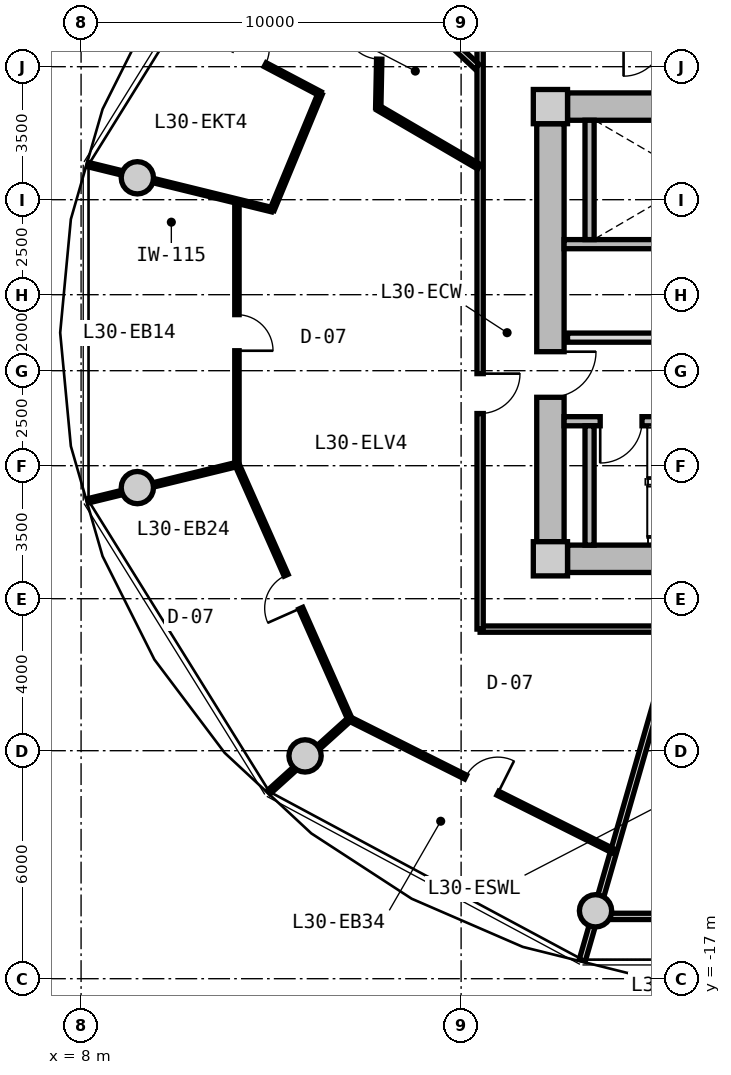
"""IFC4 building model, lengths in metres.
Left out: names, types, materials, properties, quantities, classifications, styles, units other than length and angle.
Written with IfcOpenShell. Run it as: python <this file> out.ifc"""

import sys

from ifc_helpers import new_model, si_unit, direction, frame, frame_2d, origin, origin_2d, place, context, subcontext, project, spatial, rectangle, circle, extrude, source, transform, mapped, element, fill, save


model = new_model("IFC4")
c1 = context("Model", 3, precision=1e-05, world=origin(), true_north=direction((0.0, 1.0)))
c2 = subcontext(c1, "Body", "Model", "MODEL_VIEW")
j1 = project(units=[si_unit("LENGTHUNIT", "METRE"), si_unit("PLANEANGLEUNIT", "RADIAN")], contexts=[c1])
p1 = place(None, origin())
s1 = spatial("IfcSite", under=j1, at=p1, CompositionType="ELEMENT")
p2 = place(p1, origin())
s2 = spatial("IfcBuilding", under=s1, at=p2, CompositionType="ELEMENT")
p3 = place(p2, frame((0.0, 0.0, 99.3)))
s3 = spatial("IfcBuildingStorey", under=s2, at=p3, CompositionType="ELEMENT", Elevation=99.3)
m1 = source(origin(), c2, "Body", "SweptSolid", [
    extrude(rectangle(XDim=0.9, YDim=0.9, at=origin_2d()), origin(), (0.0, 0.0, 1.0), 3.05),
])
for number, where, z_axis, x_axis in (
    (1, (20.35, -5.95, 0.0), (0.0, 0.0, 1.0), (1.0, 0.0, 0.0)),
    (2, (20.35, 5.95, 0.0), (0.0, 0.0, 1.0), (1.0, 0.0, 0.0)),
):
    element("IfcColumn", number, at=place(p3, frame(where, z_axis=z_axis, x_axis=x_axis)), inside=s3, PredefinedType="COLUMN", context=c2, shape_type="MappedRepresentation", body=[
        mapped(m1, transform((0.0, 0.0, 0.0), x_axis=(1.0, 0.0, 0.0), y_axis=(0.0, 1.0, 0.0), z_axis=(0.0, 0.0, 1.0), scale=1.0)),
    ])
m2 = source(origin(), c2, "Body", "SweptSolid", [
    extrude(rectangle(XDim=14.4, YDim=0.72, at=frame_2d((7.2, 0.0))), origin(), (0.0, 0.0, 1.0), 2.79),
])
for number, where, z_axis, x_axis in (
    (3, (20.8, 5.95, 0.0), (0.0, 0.0, 1.0), (1.0, 0.0, 0.0)),
    (4, (35.2, -5.95, 0.0), (0.0, 0.0, 1.0), (-1.0, 0.0, 0.0)),
):
    element("IfcWall", number, at=place(p3, frame(where, z_axis=z_axis, x_axis=x_axis)), inside=s3, PredefinedType="SHEAR", context=c2, shape_type="MappedRepresentation", body=[
        mapped(m2, transform((0.0, 0.0, 0.0), x_axis=(1.0, 0.0, 0.0), y_axis=(0.0, 1.0, 0.0), z_axis=(0.0, 0.0, 1.0), scale=1.0)),
    ])
m3 = source(origin(), c2, "Body", "SweptSolid", [
    extrude(rectangle(XDim=11.0, YDim=0.72, at=frame_2d((5.5, 0.0))), origin(), (0.0, 0.0, 1.0), 2.79),
])
p4 = place(p3, frame((20.35, -5.5, 0.0), z_axis=(0.0, 0.0, 1.0), x_axis=(0.0, 1.0, 0.0)))
e5 = element("IfcWall", 5, at=p4, inside=s3, PredefinedType="SHEAR", context=c2, shape_type="MappedRepresentation", body=[
    mapped(m3, transform((0.0, 0.0, 0.0), x_axis=(1.0, 0.0, 0.0), y_axis=(0.0, 1.0, 0.0), z_axis=(0.0, 0.0, 1.0), scale=1.0)),
])
p5 = place(p4, frame((3.8, 0.0, 0.0)))
e6 = element("IfcOpeningElement", 6, at=p5, cuts=e5, PredefinedType="OPENING", context=c2, shape_type="SweptSolid", body=[
    extrude(rectangle(XDim=1.2, YDim=2.15, at=frame_2d((0.6, 1.075))), frame((0.0, 0.37, 0.0), z_axis=(0.0, -1.0, 0.0), x_axis=(1.0, 0.0, 0.0)), (0.0, 0.0, 1.0), 0.74),
])
m4 = source(origin(), c2, "Body", "SweptSolid", [
    extrude(circle(Radius=0.425, at=origin_2d()), origin(), (0.0, 0.0, 1.0), 3.05),
])
for number, where, z_axis, x_axis in (
    (7, (9.481, 4.076, 0.0), (0.0, 0.0, 1.0), (1.0, 0.0, 0.0)),
    (8, (9.481, -4.076, 0.0), (0.0, 0.0, 1.0), (1.0, 0.0, 0.0)),
    (9, (13.894, -11.137, 0.0), (0.0, 0.0, 1.0), (1.0, 0.0, 0.0)),
    (10, (21.537, -15.213, 0.0), (0.0, 0.0, 1.0), (1.0, 0.0, 0.0)),
):
    element("IfcColumn", number, at=place(p3, frame(where, z_axis=z_axis, x_axis=x_axis)), inside=s3, PredefinedType="COLUMN", context=c2, shape_type="MappedRepresentation", body=[
        mapped(m4, transform((0.0, 0.0, 0.0), x_axis=(1.0, 0.0, 0.0), y_axis=(0.0, 1.0, 0.0), z_axis=(0.0, 0.0, 1.0), scale=1.0)),
    ])
m5 = source(origin(), c2, "Body", "SweptSolid", [
    extrude(rectangle(XDim=7.83, YDim=0.24, at=frame_2d((3.915, 0.0))), origin(), (0.0, 0.0, 1.0), 2.79),
])
p6 = place(p3, frame((20.71, 2.33, 0.0), z_axis=(0.0, 0.0, 1.0), x_axis=(1.0, 0.0, 0.0)))
e11 = element("IfcWall", 11, at=p6, inside=s3, PredefinedType="PARTITIONING", context=c2, shape_type="MappedRepresentation", body=[
    mapped(m5, transform((0.0, 0.0, 0.0), x_axis=(1.0, 0.0, 0.0), y_axis=(0.0, 1.0, 0.0), z_axis=(0.0, 0.0, 1.0), scale=1.0)),
])
m6 = source(origin(), c2, "Body", "SweptSolid", [
    extrude(rectangle(XDim=3.14, YDim=0.24, at=frame_2d((1.57, 0.0))), origin(), (0.0, 0.0, 1.0), 2.79),
])
p7 = place(p3, frame((21.38, 2.45, 0.0), z_axis=(0.0, 0.0, 1.0), x_axis=(0.0, 1.0, 0.0)))
e12 = element("IfcWall", 12, at=p7, inside=s3, PredefinedType="PARTITIONING", context=c2, shape_type="MappedRepresentation", body=[
    mapped(m6, transform((0.0, 0.0, 0.0), x_axis=(1.0, 0.0, 0.0), y_axis=(0.0, 1.0, 0.0), z_axis=(0.0, 0.0, 1.0), scale=1.0)),
])
p8 = place(p3, frame((20.71, -2.33, 0.0), z_axis=(0.0, 0.0, 1.0), x_axis=(1.0, 0.0, 0.0)))
e13 = element("IfcWall", 13, at=p8, inside=s3, PredefinedType="PARTITIONING", context=c2, shape_type="MappedRepresentation", body=[
    mapped(m5, transform((0.0, 0.0, 0.0), x_axis=(1.0, 0.0, 0.0), y_axis=(0.0, 1.0, 0.0), z_axis=(0.0, 0.0, 1.0), scale=1.0)),
])
p9 = place(p8, frame((0.95, 0.0, 0.0)))
e14 = element("IfcOpeningElement", 14, at=p9, cuts=e13, PredefinedType="OPENING", context=c2, shape_type="SweptSolid", body=[
    extrude(rectangle(XDim=1.1, YDim=2.15, at=frame_2d((0.55, 1.075))), frame((0.0, 0.13, 0.0), z_axis=(0.0, -1.0, 0.0), x_axis=(1.0, 0.0, 0.0)), (0.0, 0.0, 1.0), 0.26),
])
p10 = place(p3, frame((21.38, -5.59, 0.0), z_axis=(0.0, 0.0, 1.0), x_axis=(0.0, 1.0, 0.0)))
e15 = element("IfcWall", 15, at=p10, inside=s3, PredefinedType="PARTITIONING", context=c2, shape_type="MappedRepresentation", body=[
    mapped(m6, transform((0.0, 0.0, 0.0), x_axis=(1.0, 0.0, 0.0), y_axis=(0.0, 1.0, 0.0), z_axis=(0.0, 0.0, 1.0), scale=1.0)),
])
m7 = source(origin(), c2, "Body", "SweptSolid", [
    extrude(rectangle(XDim=7.62, YDim=0.24, at=frame_2d((3.81, 0.0))), origin(), (0.0, 0.0, 1.0), 2.775),
])
p11 = place(p3, frame((20.8, -0.13, 0.0), z_axis=(0.0, 0.0, 1.0), x_axis=(1.0, 0.0, 0.0)))
e16 = element("IfcWall", 16, at=p11, inside=s3, PredefinedType="PARTITIONING", context=c2, shape_type="MappedRepresentation", body=[
    mapped(m7, transform((0.0, 0.0, 0.0), x_axis=(1.0, 0.0, 0.0), y_axis=(0.0, 1.0, 0.0), z_axis=(0.0, 0.0, 1.0), scale=1.0)),
])
p12 = place(p11, frame((6.22, 0.0, 0.0)))
e17 = element("IfcOpeningElement", 17, at=p12, cuts=e16, PredefinedType="OPENING", context=c2, shape_type="SweptSolid", body=[
    extrude(rectangle(XDim=1.0, YDim=2.1, at=frame_2d((0.5, 1.05))), frame((0.0, 0.13, 0.0), z_axis=(0.0, -1.0, 0.0), x_axis=(1.0, 0.0, 0.0)), (0.0, 0.0, 1.0), 0.26),
])
p13 = place(p11, frame((2.4, 0.0, 0.0)))
e18 = element("IfcOpeningElement", 18, at=p13, cuts=e16, PredefinedType="OPENING", context=c2, shape_type="SweptSolid", body=[
    extrude(rectangle(XDim=1.0, YDim=2.1, at=frame_2d((0.5, 1.05))), frame((0.0, 0.13, 0.0), z_axis=(0.0, -1.0, 0.0), x_axis=(1.0, 0.0, 0.0)), (0.0, 0.0, 1.0), 0.26),
])
m8 = source(origin(), c2, "Body", "SweptSolid", [
    extrude(rectangle(XDim=8.6, YDim=0.165, at=frame_2d((4.3, 0.0))), origin(), (0.0, 0.0, 1.0), 2.775),
])
p14 = place(p3, frame((27.1, -7.8, 0.0), z_axis=(0.0, 0.0, 1.0), x_axis=(-1.0, 0.0, 0.0)))
e19 = element("IfcWall", 19, at=p14, inside=s3, PredefinedType="PARTITIONING", context=c2, shape_type="MappedRepresentation", body=[
    mapped(m8, transform((0.0, 0.0, 0.0), x_axis=(1.0, 0.0, 0.0), y_axis=(0.0, 1.0, 0.0), z_axis=(0.0, 0.0, 1.0), scale=1.0)),
])
m9 = source(origin(), c2, "Body", "SweptSolid", [
    extrude(rectangle(XDim=15.6, YDim=0.165, at=frame_2d((7.8, 0.0))), origin(), (0.0, 0.0, 1.0), 2.775),
])
p15 = place(p3, frame((18.5, -7.8, 0.0), z_axis=(0.0, 0.0, 1.0), x_axis=(0.0, 1.0, 0.0)))
e20 = element("IfcWall", 20, at=p15, inside=s3, PredefinedType="PARTITIONING", context=c2, shape_type="MappedRepresentation", body=[
    mapped(m9, transform((0.0, 0.0, 0.0), x_axis=(1.0, 0.0, 0.0), y_axis=(0.0, 1.0, 0.0), z_axis=(0.0, 0.0, 1.0), scale=1.0)),
])
p16 = place(p15, frame((5.673, 0.0, 0.0)))
e21 = element("IfcOpeningElement", 21, at=p16, cuts=e20, PredefinedType="OPENING", context=c2, shape_type="SweptSolid", body=[
    extrude(rectangle(XDim=1.05, YDim=2.15, at=frame_2d((0.525, 1.075))), frame((0.0, 0.093, 0.0), z_axis=(0.0, -1.0, 0.0), x_axis=(1.0, 0.0, 0.0)), (0.0, 0.0, 1.0), 0.185),
])
m10 = source(origin(), c2, "Body", "SweptSolid", [
    extrude(rectangle(XDim=7.482, YDim=0.165, at=frame_2d((3.741, 0.0))), origin(), (0.0, 0.0, 1.0), 2.275),
])
p17 = place(p3, frame((18.42, 6.998, 0.0), z_axis=(0.0, 0.0, 1.0), x_axis=(-0.732508698043, 0.680757671489, 0.0)))
e22 = element("IfcWall", 22, at=p17, inside=s3, PredefinedType="PARTITIONING", context=c2, shape_type="MappedRepresentation", body=[
    mapped(m10, transform((0.0, 0.0, 0.0), x_axis=(1.0, 0.0, 0.0), y_axis=(0.0, 1.0, 0.0), z_axis=(0.0, 0.0, 1.0), scale=1.0)),
])
m11 = source(origin(), c2, "Body", "SweptSolid", [
    extrude(rectangle(XDim=8.989, YDim=0.165, at=frame_2d((4.495, 0.0))), origin(), (0.0, 0.0, 1.0), 2.275),
])
p18 = place(p3, frame((23.678, -7.88, 0.0), z_axis=(0.0, 0.0, 1.0), x_axis=(-0.27702323008, -0.960863221274, 0.0)))
e23 = element("IfcWall", 23, at=p18, inside=s3, PredefinedType="PARTITIONING", context=c2, shape_type="MappedRepresentation", body=[
    mapped(m11, transform((0.0, 0.0, 0.0), x_axis=(1.0, 0.0, 0.0), y_axis=(0.0, 1.0, 0.0), z_axis=(0.0, 0.0, 1.0), scale=1.0)),
])
m12 = source(origin(), c2, "Body", "SweptSolid", [
    extrude(rectangle(XDim=5.814, YDim=0.165, at=frame_2d((2.907, 0.0))), origin(), (0.0, 0.0, 1.0), 2.275),
])
p19 = place(p3, frame((21.366, -15.36, 0.0), z_axis=(0.0, 0.0, 1.0), x_axis=(1.0, 0.0, 0.0)))
e24 = element("IfcWall", 24, at=p19, inside=s3, PredefinedType="PARTITIONING", context=c2, shape_type="MappedRepresentation", body=[
    mapped(m12, transform((0.0, 0.0, 0.0), x_axis=(1.0, 0.0, 0.0), y_axis=(0.0, 1.0, 0.0), z_axis=(0.0, 0.0, 1.0), scale=1.0)),
])
m13 = source(origin(), c2, "Body", "SweptSolid", [
    extrude(rectangle(XDim=6.935, YDim=0.115, at=frame_2d((3.468, 0.0))), origin(), (0.0, 0.0, 1.0), 2.775),
])
p20 = place(p3, frame((12.101, 3.468, 0.0), z_axis=(0.0, 0.0, 1.0), x_axis=(0.0, -1.0, 0.0)))
e25 = element("IfcWall", 25, at=p20, inside=s3, PredefinedType="PARTITIONING", context=c2, shape_type="MappedRepresentation", body=[
    mapped(m13, transform((0.0, 0.0, 0.0), x_axis=(1.0, 0.0, 0.0), y_axis=(0.0, 1.0, 0.0), z_axis=(0.0, 0.0, 1.0), scale=1.0)),
])
p21 = place(p20, frame((2.993, 0.0, 0.0)))
e26 = element("IfcOpeningElement", 26, at=p21, cuts=e25, PredefinedType="OPENING", context=c2, shape_type="SweptSolid", body=[
    extrude(rectangle(XDim=0.95, YDim=2.1, at=frame_2d((0.475, 1.05))), frame((0.0, 0.067, 0.0), z_axis=(0.0, -1.0, 0.0), x_axis=(1.0, 0.0, 0.0)), (0.0, 0.0, 1.0), 0.135),
])
m14 = source(origin(), c2, "Body", "SweptSolid", [
    extrude(rectangle(XDim=4.992, YDim=0.115, at=frame_2d((2.496, 0.0))), origin(), (0.0, 0.0, 1.0), 2.275),
])
p22 = place(p3, frame((13.026, 3.236, 0.0), z_axis=(0.0, 0.0, 1.0), x_axis=(-0.971191841847, 0.238298985162, 0.0)))
e27 = element("IfcWall", 27, at=p22, inside=s3, PredefinedType="PARTITIONING", context=c2, shape_type="MappedRepresentation", body=[
    mapped(m14, transform((0.0, 0.0, 0.0), x_axis=(1.0, 0.0, 0.0), y_axis=(0.0, 1.0, 0.0), z_axis=(0.0, 0.0, 1.0), scale=1.0)),
])
m15 = source(origin(), c2, "Body", "SweptSolid", [
    extrude(rectangle(XDim=7.326, YDim=0.115, at=frame_2d((3.663, 0.0))), origin(), (0.0, 0.0, 1.0), 2.775),
])
p23 = place(p3, frame((12.104, -3.467, 0.0), z_axis=(0.0, 0.0, 1.0), x_axis=(0.405263245425, -0.914200033859, 0.0)))
e28 = element("IfcWall", 28, at=p23, inside=s3, PredefinedType="PARTITIONING", context=c2, shape_type="MappedRepresentation", body=[
    mapped(m15, transform((0.0, 0.0, 0.0), x_axis=(1.0, 0.0, 0.0), y_axis=(0.0, 1.0, 0.0), z_axis=(0.0, 0.0, 1.0), scale=1.0)),
])
p24 = place(p23, frame((3.188, 0.0, 0.0)))
e29 = element("IfcOpeningElement", 29, at=p24, cuts=e28, PredefinedType="OPENING", context=c2, shape_type="SweptSolid", body=[
    extrude(rectangle(XDim=0.95, YDim=2.1, at=frame_2d((0.475, 1.05))), frame((0.0, 0.067, 0.0), z_axis=(0.0, -1.0, 0.0), x_axis=(1.0, 0.0, 0.0)), (0.0, 0.0, 1.0), 0.135),
])
m16 = source(origin(), c2, "Body", "SweptSolid", [
    extrude(rectangle(XDim=4.042, YDim=0.115, at=frame_2d((2.021, 0.0))), origin(), (0.0, 0.0, 1.0), 2.275),
])
p25 = place(p3, frame((12.104, -3.467, 0.0), z_axis=(0.0, 0.0, 1.0), x_axis=(-0.971460277747, -0.237202295014, 0.0)))
e30 = element("IfcWall", 30, at=p25, inside=s3, PredefinedType="PARTITIONING", context=c2, shape_type="MappedRepresentation", body=[
    mapped(m16, transform((0.0, 0.0, 0.0), x_axis=(1.0, 0.0, 0.0), y_axis=(0.0, 1.0, 0.0), z_axis=(0.0, 0.0, 1.0), scale=1.0)),
])
m17 = source(origin(), c2, "Body", "SweptSolid", [
    extrude(rectangle(XDim=7.767, YDim=0.115, at=frame_2d((3.884, 0.0))), origin(), (0.0, 0.0, 1.0), 2.775),
])
p26 = place(p3, frame((15.07, -10.167, 0.0), z_axis=(0.0, 0.0, 1.0), x_axis=(0.894188177352, -0.447691303783, 0.0)))
e31 = element("IfcWall", 31, at=p26, inside=s3, PredefinedType="PARTITIONING", context=c2, shape_type="MappedRepresentation", body=[
    mapped(m17, transform((0.0, 0.0, 0.0), x_axis=(1.0, 0.0, 0.0), y_axis=(0.0, 1.0, 0.0), z_axis=(0.0, 0.0, 1.0), scale=1.0)),
])
p27 = place(p26, frame((3.409, 0.0, 0.0)))
e32 = element("IfcOpeningElement", 32, at=p27, cuts=e31, PredefinedType="OPENING", context=c2, shape_type="SweptSolid", body=[
    extrude(rectangle(XDim=0.95, YDim=2.1, at=frame_2d((0.475, 1.05))), frame((0.0, 0.067, 0.0), z_axis=(0.0, -1.0, 0.0), x_axis=(1.0, 0.0, 0.0)), (0.0, 0.0, 1.0), 0.135),
])
m18 = source(origin(), c2, "Body", "SweptSolid", [
    extrude(rectangle(XDim=2.871, YDim=0.115, at=frame_2d((1.435, 0.0))), origin(), (0.0, 0.0, 1.0), 2.275),
])
p28 = place(p3, frame((15.07, -10.167, 0.0), z_axis=(0.0, 0.0, 1.0), x_axis=(-0.742125841552, -0.670260572688, 0.0)))
e33 = element("IfcWall", 33, at=p28, inside=s3, PredefinedType="PARTITIONING", context=c2, shape_type="MappedRepresentation", body=[
    mapped(m18, transform((0.0, 0.0, 0.0), x_axis=(1.0, 0.0, 0.0), y_axis=(0.0, 1.0, 0.0), z_axis=(0.0, 0.0, 1.0), scale=1.0)),
])
m19 = source(origin(), c2, "Body", "SweptSolid", [
    extrude(rectangle(XDim=3.069, YDim=0.14, at=frame_2d((1.535, 0.0))), origin(), (0.0, 0.0, 1.0), 2.775),
])
p29 = place(p3, frame((18.47, 4.368, 0.0), z_axis=(0.0, 0.0, 1.0), x_axis=(-0.863524911282, 0.504306184371, 0.0)))
e34 = element("IfcWall", 34, at=p29, inside=s3, PredefinedType="PARTITIONING", context=c2, shape_type="MappedRepresentation", body=[
    mapped(m19, transform((0.0, 0.0, 0.0), x_axis=(1.0, 0.0, 0.0), y_axis=(0.0, 1.0, 0.0), z_axis=(0.0, 0.0, 1.0), scale=1.0)),
])
m20 = source(origin(), c2, "Body", "SweptSolid", [
    extrude(rectangle(XDim=3.487, YDim=0.14, at=frame_2d((1.743, 0.0))), origin(), (0.0, 0.0, 1.0), 2.775),
])
p30 = place(p3, frame((15.82, 5.916, 0.0), z_axis=(0.0, 0.0, 1.0), x_axis=(0.020026799331, 0.999799443543, 0.0)))
e35 = element("IfcWall", 35, at=p30, inside=s3, PredefinedType="PARTITIONING", context=c2, shape_type="MappedRepresentation", body=[
    mapped(m20, transform((0.0, 0.0, 0.0), x_axis=(1.0, 0.0, 0.0), y_axis=(0.0, 1.0, 0.0), z_axis=(0.0, 0.0, 1.0), scale=1.0)),
])
p31 = place(p30, frame((1.283, 0.0, 0.0)))
e36 = element("IfcOpeningElement", 36, at=p31, cuts=e35, PredefinedType="OPENING", context=c2, shape_type="SweptSolid", body=[
    extrude(rectangle(XDim=0.92, YDim=2.1, at=frame_2d((0.46, 1.05))), frame((0.0, 0.08, 0.0), z_axis=(0.0, -1.0, 0.0), x_axis=(1.0, 0.0, 0.0)), (0.0, 0.0, 1.0), 0.16),
])
m21 = source(origin(), c2, "Body", "SweptSolid", [
    extrude(rectangle(XDim=4.221, YDim=0.115, at=frame_2d((2.11, 0.0))), origin(), (0.0, 0.0, 1.0), 2.775),
])
p32 = place(p3, frame((14.292, 6.29, 0.0), z_axis=(0.0, 0.0, 1.0), x_axis=(-0.88458298465, 0.466382829087, 0.0)))
e37 = element("IfcWall", 37, at=p32, inside=s3, PredefinedType="PARTITIONING", context=c2, shape_type="MappedRepresentation", body=[
    mapped(m21, transform((0.0, 0.0, 0.0), x_axis=(1.0, 0.0, 0.0), y_axis=(0.0, 1.0, 0.0), z_axis=(0.0, 0.0, 1.0), scale=1.0)),
])
p33 = place(p32, frame((1.635, 0.0, 0.0)))
e38 = element("IfcOpeningElement", 38, at=p33, cuts=e37, PredefinedType="OPENING", context=c2, shape_type="SweptSolid", body=[
    extrude(rectangle(XDim=0.95, YDim=2.1, at=frame_2d((0.475, 1.05))), frame((0.0, 0.067, 0.0), z_axis=(0.0, -1.0, 0.0), x_axis=(1.0, 0.0, 0.0)), (0.0, 0.0, 1.0), 0.135),
])
m22 = source(origin(), c2, "Body", "SweptSolid", [
    extrude(rectangle(XDim=3.306, YDim=0.115, at=frame_2d((1.653, 0.0))), origin(), (0.0, 0.0, 1.0), 2.775),
])
p34 = place(p3, frame((14.292, 6.29, 0.0), z_axis=(0.0, 0.0, 1.0), x_axis=(-0.382506175075, -0.923952934965, 0.0)))
e39 = element("IfcWall", 39, at=p34, inside=s3, PredefinedType="PARTITIONING", context=c2, shape_type="MappedRepresentation", body=[
    mapped(m22, transform((0.0, 0.0, 0.0), x_axis=(1.0, 0.0, 0.0), y_axis=(0.0, 1.0, 0.0), z_axis=(0.0, 0.0, 1.0), scale=1.0)),
])
m23 = source(origin(), c2, "Body", "SweptSolid", [
    extrude(rectangle(XDim=1.1, YDim=2.15, at=frame_2d((0.55, 1.075))), frame((0.0, 0.025, 0.0), z_axis=(0.0, -1.0, 0.0), x_axis=(1.0, 0.0, 0.0)), (0.0, 0.0, 1.0), 0.05),
])
p35 = place(p9, frame((1.1, 0.0, 0.0), z_axis=(0.0, 0.0, 1.0), x_axis=(-1.0, 0.0, 0.0)))
e40 = element("IfcDoor", 40, at=p35, inside=s3, OperationType="SINGLE_SWING_RIGHT", PredefinedType="DOOR", context=c2, shape_type="MappedRepresentation", body=[
    mapped(m23, transform((0.0, 0.0, 0.0), x_axis=(1.0, 0.0, 0.0), y_axis=(0.0, 1.0, 0.0), z_axis=(0.0, 0.0, 1.0), scale=1.0)),
])
fill(e14, e40)
m24 = source(origin(), c2, "Body", "SweptSolid", [
    extrude(rectangle(XDim=1.2, YDim=2.15, at=frame_2d((0.6, 1.075))), frame((0.0, 0.025, 0.0), z_axis=(0.0, -1.0, 0.0), x_axis=(1.0, 0.0, 0.0)), (0.0, 0.0, 1.0), 0.05),
])
p36 = place(p5, frame((1.2, 0.0, 0.0), z_axis=(0.0, 0.0, 1.0), x_axis=(-1.0, 0.0, 0.0)))
e41 = element("IfcDoor", 41, at=p36, inside=s3, OperationType="SINGLE_SWING_LEFT", PredefinedType="DOOR", context=c2, shape_type="MappedRepresentation", body=[
    mapped(m24, transform((0.0, 0.0, 0.0), x_axis=(1.0, 0.0, 0.0), y_axis=(0.0, 1.0, 0.0), z_axis=(0.0, 0.0, 1.0), scale=1.0)),
])
fill(e6, e41)
m25 = source(origin(), c2, "Body", "SweptSolid", [
    extrude(rectangle(XDim=1.05, YDim=2.15, at=frame_2d((0.525, 1.075))), frame((0.0, 0.025, 0.0), z_axis=(0.0, -1.0, 0.0), x_axis=(1.0, 0.0, 0.0)), (0.0, 0.0, 1.0), 0.05),
])
p37 = place(p16, frame((1.05, 0.0, 0.0), z_axis=(0.0, 0.0, 1.0), x_axis=(-1.0, 0.0, 0.0)))
e42 = element("IfcDoor", 42, at=p37, inside=s3, OperationType="SINGLE_SWING_LEFT", PredefinedType="DOOR", context=c2, shape_type="MappedRepresentation", body=[
    mapped(m25, transform((0.0, 0.0, 0.0), x_axis=(1.0, 0.0, 0.0), y_axis=(0.0, 1.0, 0.0), z_axis=(0.0, 0.0, 1.0), scale=1.0)),
])
fill(e21, e42)
m26 = source(origin(), c2, "Body", "SweptSolid", [
    extrude(rectangle(XDim=0.92, YDim=2.1, at=frame_2d((0.46, 1.05))), frame((0.0, 0.025, 0.0), z_axis=(0.0, -1.0, 0.0), x_axis=(1.0, 0.0, 0.0)), (0.0, 0.0, 1.0), 0.05),
])
p38 = place(p31, origin())
e43 = element("IfcDoor", 43, at=p38, inside=s3, OperationType="SINGLE_SWING_RIGHT", PredefinedType="DOOR", context=c2, shape_type="MappedRepresentation", body=[
    mapped(m26, transform((0.0, 0.0, 0.0), x_axis=(1.0, 0.0, 0.0), y_axis=(0.0, 1.0, 0.0), z_axis=(0.0, 0.0, 1.0), scale=1.0)),
])
fill(e36, e43)
m27 = source(origin(), c2, "Body", "SweptSolid", [
    extrude(rectangle(XDim=0.95, YDim=2.1, at=frame_2d((0.475, 1.05))), frame((0.0, 0.025, 0.0), z_axis=(0.0, -1.0, 0.0), x_axis=(1.0, 0.0, 0.0)), (0.0, 0.0, 1.0), 0.05),
])
p39 = place(p33, frame((0.95, 0.0, 0.0), z_axis=(0.0, 0.0, 1.0), x_axis=(-1.0, 0.0, 0.0)))
e44 = element("IfcDoor", 44, at=p39, inside=s3, OperationType="SINGLE_SWING_LEFT", PredefinedType="DOOR", context=c2, shape_type="MappedRepresentation", body=[
    mapped(m27, transform((0.0, 0.0, 0.0), x_axis=(1.0, 0.0, 0.0), y_axis=(0.0, 1.0, 0.0), z_axis=(0.0, 0.0, 1.0), scale=1.0)),
])
fill(e38, e44)
p40 = place(p21, origin())
e45 = element("IfcDoor", 45, at=p40, inside=s3, OperationType="SINGLE_SWING_RIGHT", PredefinedType="DOOR", context=c2, shape_type="MappedRepresentation", body=[
    mapped(m27, transform((0.0, 0.0, 0.0), x_axis=(1.0, 0.0, 0.0), y_axis=(0.0, 1.0, 0.0), z_axis=(0.0, 0.0, 1.0), scale=1.0)),
])
fill(e26, e45)
p41 = place(p24, frame((0.95, 0.0, 0.0), z_axis=(0.0, 0.0, 1.0), x_axis=(-1.0, 0.0, 0.0)))
e46 = element("IfcDoor", 46, at=p41, inside=s3, OperationType="SINGLE_SWING_LEFT", PredefinedType="DOOR", context=c2, shape_type="MappedRepresentation", body=[
    mapped(m27, transform((0.0, 0.0, 0.0), x_axis=(1.0, 0.0, 0.0), y_axis=(0.0, 1.0, 0.0), z_axis=(0.0, 0.0, 1.0), scale=1.0)),
])
fill(e29, e46)
p42 = place(p27, origin())
e47 = element("IfcDoor", 47, at=p42, inside=s3, OperationType="SINGLE_SWING_RIGHT", PredefinedType="DOOR", context=c2, shape_type="MappedRepresentation", body=[
    mapped(m27, transform((0.0, 0.0, 0.0), x_axis=(1.0, 0.0, 0.0), y_axis=(0.0, 1.0, 0.0), z_axis=(0.0, 0.0, 1.0), scale=1.0)),
])
fill(e32, e47)
save(model, sys.argv[1])
